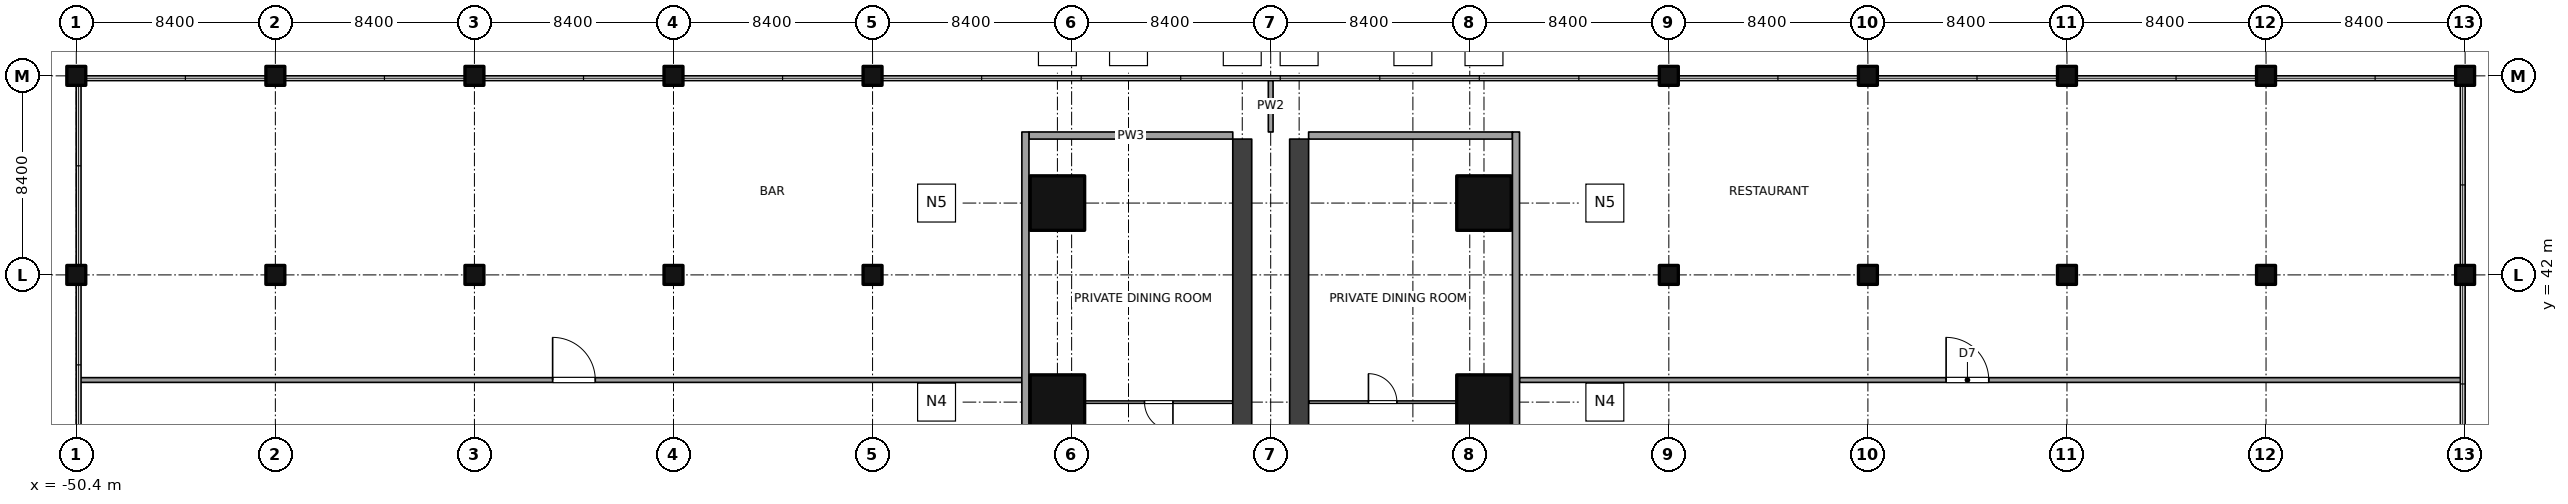
"""IFC4 building model, lengths in metres.
Left out: names, types, materials, properties, quantities, classifications, styles, units other than length and angle.
Written with IfcOpenShell. Run it as: python <this file> out.ifc"""

import sys

from ifc_helpers import new_model, si_unit, direction, frame, frame_2d, origin, origin_2d, place, context, subcontext, project, spatial, rectangle, extrude, element, fill, save


model = new_model("IFC4")
c1 = context("Model", 3, precision=1e-05, world=origin(), true_north=direction((0.0, 1.0)))
c2 = subcontext(c1, "Body", "Model", "MODEL_VIEW")
j1 = project(units=[si_unit("LENGTHUNIT", "METRE"), si_unit("PLANEANGLEUNIT", "RADIAN")], contexts=[c1])
p1 = place(None, origin())
s1 = spatial("IfcSite", under=j1, at=p1, CompositionType="ELEMENT")
p2 = place(p1, origin())
s2 = spatial("IfcBuilding", under=s1, at=p2, CompositionType="ELEMENT")
p3 = place(p2, frame((0.0, 0.0, 21.0)))
s3 = spatial("IfcBuildingStorey", under=s2, at=p3, CompositionType="ELEMENT", Elevation=21.0)
for number, where, z_axis, x_axis in (
    (1, (-9.0, 36.632, 0.0), (0.0, 0.0, 1.0), (1.0, 0.0, 0.0)),
    (2, (9.0, 36.632, 0.0), (0.0, 0.0, 1.0), (1.0, 0.0, 0.0)),
    (3, (-9.0, 45.031, 0.0), (0.0, 0.0, 1.0), (1.0, 0.0, 0.0)),
    (4, (9.0, 45.031, 0.0), (0.0, 0.0, 1.0), (1.0, 0.0, 0.0)),
):
    element("IfcColumn", number, at=place(p3, frame(where, z_axis=z_axis, x_axis=x_axis)), inside=s3, PredefinedType="COLUMN", context=c2, shape_type="SweptSolid", body=[
        extrude(rectangle(XDim=2.3, YDim=2.3, at=origin_2d()), origin(), (0.0, 0.0, 1.0), 5.0),
    ])
for number, where, z_axis, x_axis in (
    (5, (-50.4, 42.0, 0.0), (0.0, 0.0, 1.0), (1.0, 0.0, 0.0)),
    (6, (-50.4, 50.4, 0.0), (0.0, 0.0, 1.0), (1.0, 0.0, 0.0)),
    (7, (-42.0, 42.0, 0.0), (0.0, 0.0, 1.0), (1.0, 0.0, 0.0)),
    (8, (-42.0, 50.4, 0.0), (0.0, 0.0, 1.0), (1.0, 0.0, 0.0)),
    (9, (-33.6, 42.0, 0.0), (0.0, 0.0, 1.0), (1.0, 0.0, 0.0)),
    (10, (-33.6, 50.4, 0.0), (0.0, 0.0, 1.0), (1.0, 0.0, 0.0)),
    (11, (-25.2, 42.0, 0.0), (0.0, 0.0, 1.0), (1.0, 0.0, 0.0)),
    (12, (-25.2, 50.4, 0.0), (0.0, 0.0, 1.0), (1.0, 0.0, 0.0)),
    (13, (-16.8, 42.0, 0.0), (0.0, 0.0, 1.0), (1.0, 0.0, 0.0)),
    (14, (-16.8, 50.4, 0.0), (0.0, 0.0, 1.0), (1.0, 0.0, 0.0)),
    (15, (16.8, 42.0, 0.0), (0.0, 0.0, 1.0), (1.0, 0.0, 0.0)),
    (16, (16.8, 50.4, 0.0), (0.0, 0.0, 1.0), (1.0, 0.0, 0.0)),
    (17, (25.2, 42.0, 0.0), (0.0, 0.0, 1.0), (1.0, 0.0, 0.0)),
    (18, (25.2, 50.4, 0.0), (0.0, 0.0, 1.0), (1.0, 0.0, 0.0)),
    (19, (33.6, 42.0, 0.0), (0.0, 0.0, 1.0), (1.0, 0.0, 0.0)),
    (20, (33.6, 50.4, 0.0), (0.0, 0.0, 1.0), (1.0, 0.0, 0.0)),
    (21, (42.0, 42.0, 0.0), (0.0, 0.0, 1.0), (1.0, 0.0, 0.0)),
    (22, (42.0, 50.4, 0.0), (0.0, 0.0, 1.0), (1.0, 0.0, 0.0)),
    (23, (50.4, 42.0, 0.0), (0.0, 0.0, 1.0), (1.0, 0.0, 0.0)),
    (24, (50.4, 50.4, 0.0), (0.0, 0.0, 1.0), (1.0, 0.0, 0.0)),
):
    element("IfcColumn", number, at=place(p3, frame(where, z_axis=z_axis, x_axis=x_axis)), inside=s3, PredefinedType="COLUMN", context=c2, shape_type="SweptSolid", body=[
        extrude(rectangle(XDim=0.8, YDim=0.8, at=origin_2d()), origin(), (0.0, 0.0, 1.0), 5.0),
    ])
p4 = place(p3, frame((-1.2, 10.981, 0.0), z_axis=(0.0, 0.0, 1.0), x_axis=(0.0, 1.0, 0.0)))
e25 = element("IfcWall", 25, at=p4, inside=s3, PredefinedType="SHEAR", context=c2, shape_type="SweptSolid", body=[
    extrude(rectangle(XDim=36.75, YDim=0.8, at=frame_2d((18.375, 0.0))), origin(), (0.0, 0.0, 1.0), 5.0),
])
p5 = place(p4, frame((2.75, 0.0, 0.0)))
e26 = element("IfcOpeningElement", 26, at=p5, cuts=e25, PredefinedType="OPENING", context=c2, shape_type="SweptSolid", body=[
    extrude(rectangle(XDim=1.2, YDim=2.1, at=frame_2d((0.6, 1.05))), frame((0.0, 0.41, 0.0), z_axis=(0.0, -1.0, 0.0), x_axis=(1.0, 0.0, 0.0)), (0.0, 0.0, 1.0), 0.82),
])
p6 = place(p4, frame((7.35, 0.0, 0.0)))
e27 = element("IfcOpeningElement", 27, at=p6, cuts=e25, PredefinedType="OPENING", context=c2, shape_type="SweptSolid", body=[
    extrude(rectangle(XDim=1.2, YDim=2.1, at=frame_2d((0.6, 1.05))), frame((0.0, 0.41, 0.0), z_axis=(0.0, -1.0, 0.0), x_axis=(1.0, 0.0, 0.0)), (0.0, 0.0, 1.0), 0.82),
])
p7 = place(p3, frame((1.2, 10.981, 0.0), z_axis=(0.0, 0.0, 1.0), x_axis=(0.0, 1.0, 0.0)))
e28 = element("IfcWall", 28, at=p7, inside=s3, PredefinedType="SHEAR", context=c2, shape_type="SweptSolid", body=[
    extrude(rectangle(XDim=36.75, YDim=0.8, at=frame_2d((18.375, 0.0))), origin(), (0.0, 0.0, 1.0), 5.0),
])
p8 = place(p7, frame((10.0, 0.0, 0.0)))
e29 = element("IfcOpeningElement", 29, at=p8, cuts=e28, PredefinedType="OPENING", context=c2, shape_type="SweptSolid", body=[
    extrude(rectangle(XDim=1.0, YDim=2.1, at=frame_2d((0.5, 1.05))), frame((0.0, 0.41, 0.0), z_axis=(0.0, -1.0, 0.0), x_axis=(1.0, 0.0, 0.0)), (0.0, 0.0, 1.0), 0.82),
])
p9 = place(p7, frame((2.85, 0.0, 0.0)))
e30 = element("IfcOpeningElement", 30, at=p9, cuts=e28, PredefinedType="OPENING", context=c2, shape_type="SweptSolid", body=[
    extrude(rectangle(XDim=1.2, YDim=2.1, at=frame_2d((0.6, 1.05))), frame((0.0, 0.41, 0.0), z_axis=(0.0, -1.0, 0.0), x_axis=(1.0, 0.0, 0.0)), (0.0, 0.0, 1.0), 0.82),
])
p10 = place(p3, frame((-1.6, 36.632, 0.0), z_axis=(0.0, 0.0, 1.0), x_axis=(-1.0, 0.0, 0.0)))
e31 = element("IfcWall", 31, at=p10, inside=s3, PredefinedType="PARTITIONING", context=c2, shape_type="SweptSolid", body=[
    extrude(rectangle(XDim=6.25, YDim=0.1, at=frame_2d((3.125, 0.0))), origin(), (0.0, 0.0, 1.0), 2.8),
])
p11 = place(p10, frame((2.525, 0.0, 0.0)))
e32 = element("IfcOpeningElement", 32, at=p11, cuts=e31, PredefinedType="OPENING", context=c2, shape_type="SweptSolid", body=[
    extrude(rectangle(XDim=1.2, YDim=2.1, at=frame_2d((0.6, 1.05))), frame((0.0, 0.06, 0.0), z_axis=(0.0, -1.0, 0.0), x_axis=(1.0, 0.0, 0.0)), (0.0, 0.0, 1.0), 0.12),
])
p12 = place(p3, frame((1.6, 36.632, 0.0), z_axis=(0.0, 0.0, 1.0), x_axis=(1.0, 0.0, 0.0)))
e33 = element("IfcWall", 33, at=p12, inside=s3, PredefinedType="PARTITIONING", context=c2, shape_type="SweptSolid", body=[
    extrude(rectangle(XDim=6.25, YDim=0.1, at=frame_2d((3.125, 0.0))), origin(), (0.0, 0.0, 1.0), 2.8),
])
p13 = place(p12, frame((2.525, 0.0, 0.0)))
e34 = element("IfcOpeningElement", 34, at=p13, cuts=e33, PredefinedType="OPENING", context=c2, shape_type="SweptSolid", body=[
    extrude(rectangle(XDim=1.2, YDim=2.1, at=frame_2d((0.6, 1.05))), frame((0.0, 0.06, 0.0), z_axis=(0.0, -1.0, 0.0), x_axis=(1.0, 0.0, 0.0)), (0.0, 0.0, 1.0), 0.12),
])
p14 = place(p3, frame((0.0, 48.031, 0.0), z_axis=(0.0, 0.0, 1.0), x_axis=(0.0, 1.0, 0.0)))
e35 = element("IfcWall", 35, at=p14, inside=s3, PredefinedType="SOLIDWALL", context=c2, shape_type="SweptSolid", body=[
    extrude(rectangle(XDim=2.176, YDim=0.2, at=frame_2d((1.088, 0.0))), origin(), (0.0, 0.0, 1.0), 4.6),
])
p15 = place(p3, frame((10.5, 37.564, 0.0), z_axis=(0.0, 0.0, 1.0), x_axis=(1.0, 0.0, 0.0)))
e36 = element("IfcWall", 36, at=p15, inside=s3, PredefinedType="SOLIDWALL", context=c2, shape_type="SweptSolid", body=[
    extrude(rectangle(XDim=39.737, YDim=0.2, at=frame_2d((19.869, 0.0))), origin(), (0.0, 0.0, 1.0), 4.6),
])
p16 = place(p15, frame((18.0, 0.0, 0.0)))
e37 = element("IfcOpeningElement", 37, at=p16, cuts=e36, PredefinedType="OPENING", context=c2, shape_type="SweptSolid", body=[
    extrude(rectangle(XDim=1.8, YDim=2.4, at=frame_2d((0.9, 1.2))), frame((0.0, 0.11, 0.0), z_axis=(0.0, -1.0, 0.0), x_axis=(1.0, 0.0, 0.0)), (0.0, 0.0, 1.0), 0.22),
])
p17 = place(p3, frame((-50.237, 37.564, 0.0), z_axis=(0.0, 0.0, 1.0), x_axis=(1.0, 0.0, 0.0)))
e38 = element("IfcWall", 38, at=p17, inside=s3, PredefinedType="SOLIDWALL", context=c2, shape_type="SweptSolid", body=[
    extrude(rectangle(XDim=39.737, YDim=0.2, at=frame_2d((19.869, 0.0))), origin(), (0.0, 0.0, 1.0), 4.6),
])
p18 = place(p17, frame((19.937, 0.0, 0.0)))
e39 = element("IfcOpeningElement", 39, at=p18, cuts=e38, PredefinedType="OPENING", context=c2, shape_type="SweptSolid", body=[
    extrude(rectangle(XDim=1.8, YDim=2.4, at=frame_2d((0.9, 1.2))), frame((0.0, 0.11, 0.0), z_axis=(0.0, -1.0, 0.0), x_axis=(1.0, 0.0, 0.0)), (0.0, 0.0, 1.0), 0.22),
])
for number, where, z_axis, x_axis in (
    (40, (-1.6, 47.882, 0.0), (0.0, 0.0, 1.0), (-1.0, 0.0, 0.0)),
    (41, (1.6, 47.882, 0.0), (0.0, 0.0, 1.0), (1.0, 0.0, 0.0)),
):
    element("IfcWall", number, at=place(p3, frame(where, z_axis=z_axis, x_axis=x_axis)), inside=s3, PredefinedType="SOLIDWALL", context=c2, shape_type="SweptSolid", body=[
        extrude(rectangle(XDim=8.6, YDim=0.3, at=frame_2d((4.3, 0.0))), origin(), (0.0, 0.0, 1.0), 3.0),
    ])
p19 = place(p3, frame((-10.35, 6.149, 0.0), z_axis=(0.0, 0.0, 1.0), x_axis=(0.0, 1.0, 0.0)))
e42 = element("IfcWall", 42, at=p19, inside=s3, PredefinedType="SOLIDWALL", context=c2, shape_type="SweptSolid", body=[
    extrude(rectangle(XDim=41.883, YDim=0.3, at=frame_2d((20.941, 0.0))), origin(), (0.0, 0.0, 1.0), 4.6),
])
p20 = place(p19, frame((25.383, 0.0, 0.0)))
e43 = element("IfcOpeningElement", 43, at=p20, cuts=e42, PredefinedType="OPENING", context=c2, shape_type="SweptSolid", body=[
    extrude(rectangle(XDim=1.8, YDim=2.4, at=frame_2d((0.9, 1.2))), frame((0.0, 0.16, 0.0), z_axis=(0.0, -1.0, 0.0), x_axis=(1.0, 0.0, 0.0)), (0.0, 0.0, 1.0), 0.32),
])
p21 = place(p3, frame((10.35, 6.149, 0.0), z_axis=(0.0, 0.0, 1.0), x_axis=(0.0, 1.0, 0.0)))
e44 = element("IfcWall", 44, at=p21, inside=s3, PredefinedType="SOLIDWALL", context=c2, shape_type="SweptSolid", body=[
    extrude(rectangle(XDim=41.883, YDim=0.3, at=frame_2d((20.941, 0.0))), origin(), (0.0, 0.0, 1.0), 4.6),
])
p22 = place(p21, frame((25.383, 0.0, 0.0)))
e45 = element("IfcOpeningElement", 45, at=p22, cuts=e44, PredefinedType="OPENING", context=c2, shape_type="SweptSolid", body=[
    extrude(rectangle(XDim=1.8, YDim=2.4, at=frame_2d((0.9, 1.2))), frame((0.0, 0.16, 0.0), z_axis=(0.0, -1.0, 0.0), x_axis=(1.0, 0.0, 0.0)), (0.0, 0.0, 1.0), 0.32),
])
p23 = place(p11, origin())
e46 = element("IfcDoor", 46, at=p23, inside=s3, OperationType="DOUBLE_SWING_LEFT", PredefinedType="DOOR", context=c2, shape_type="SweptSolid", body=[
    extrude(rectangle(XDim=1.2, YDim=2.1, at=frame_2d((0.6, 1.05))), frame((0.0, 0.025, 0.0), z_axis=(0.0, -1.0, 0.0), x_axis=(1.0, 0.0, 0.0)), (0.0, 0.0, 1.0), 0.05),
])
fill(e32, e46)
p24 = place(p13, origin())
e47 = element("IfcDoor", 47, at=p24, inside=s3, OperationType="DOUBLE_SWING_LEFT", PredefinedType="DOOR", context=c2, shape_type="SweptSolid", body=[
    extrude(rectangle(XDim=1.2, YDim=2.1, at=frame_2d((0.6, 1.05))), frame((0.0, 0.025, 0.0), z_axis=(0.0, -1.0, 0.0), x_axis=(1.0, 0.0, 0.0)), (0.0, 0.0, 1.0), 0.05),
])
fill(e34, e47)
p25 = place(p16, origin())
e48 = element("IfcDoor", 48, at=p25, inside=s3, OperationType="DOUBLE_DOOR_DOUBLE_SWING", PredefinedType="DOOR", context=c2, shape_type="SweptSolid", body=[
    extrude(rectangle(XDim=1.8, YDim=2.4, at=frame_2d((0.9, 1.2))), frame((0.0, 0.025, 0.0), z_axis=(0.0, -1.0, 0.0), x_axis=(1.0, 0.0, 0.0)), (0.0, 0.0, 1.0), 0.05),
])
fill(e37, e48)
p26 = place(p18, origin())
e49 = element("IfcDoor", 49, at=p26, inside=s3, OperationType="DOUBLE_DOOR_DOUBLE_SWING", PredefinedType="DOOR", context=c2, shape_type="SweptSolid", body=[
    extrude(rectangle(XDim=1.8, YDim=2.4, at=frame_2d((0.9, 1.2))), frame((0.0, 0.025, 0.0), z_axis=(0.0, -1.0, 0.0), x_axis=(1.0, 0.0, 0.0)), (0.0, 0.0, 1.0), 0.05),
])
fill(e39, e49)
save(model, sys.argv[1])
